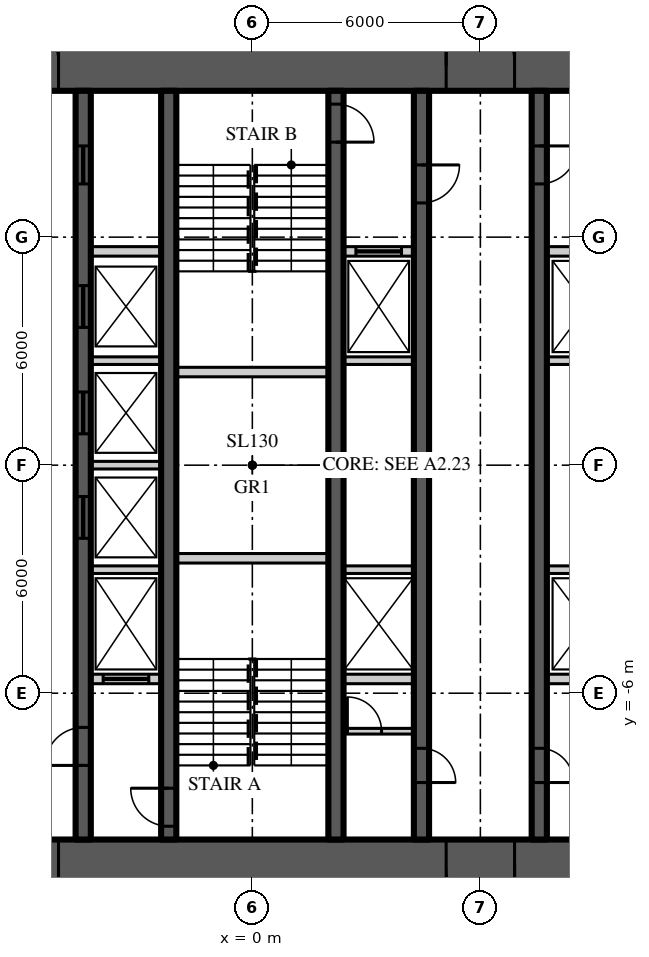
"""IFC4 building model, lengths in metres.
Left out: names, types, materials, properties, quantities, classifications, styles, units other than length and angle.
Written with IfcOpenShell. Run it as: python <this file> out.ifc"""

import sys

from ifc_helpers import new_model, si_unit, direction, frame, frame_2d, origin, place, context, subcontext, project, spatial, rectangle, extrude, element, fill, save


model = new_model("IFC4")
c1 = context("Model", 3, precision=1e-05, world=origin(), true_north=direction((0.0, 1.0)))
c2 = subcontext(c1, "Body", "Model", "MODEL_VIEW")
j1 = project(units=[si_unit("LENGTHUNIT", "METRE"), si_unit("PLANEANGLEUNIT", "RADIAN")], contexts=[c1])
p1 = place(None, origin())
s1 = spatial("IfcSite", under=j1, at=p1, CompositionType="ELEMENT")
p2 = place(p1, origin())
s2 = spatial("IfcBuilding", under=s1, at=p2, CompositionType="ELEMENT")
p3 = place(p2, frame((0.0, 0.0, 178.8)))
s3 = spatial("IfcBuildingStorey", under=s2, at=p3, CompositionType="ELEMENT", Elevation=178.8)
p4 = place(p3, frame((-11.15, 10.5, 0.0), z_axis=(0.0, 0.0, 1.0), x_axis=(1.0, 0.0, 0.0)))
e1 = element("IfcWall", 1, at=p4, inside=s3, PredefinedType="SHEAR", context=c2, shape_type="SweptSolid", body=[
    extrude(rectangle(XDim=22.3, YDim=1.3, at=frame_2d((11.15, 0.0))), origin(), (0.0, 0.0, 1.0), 3.9),
])
p5 = place(p4, frame((4.25, 0.0, 0.0)))
e2 = element("IfcOpeningElement", 2, at=p5, cuts=e1, PredefinedType="OPENING", context=c2, shape_type="SweptSolid", body=[
    extrude(rectangle(XDim=1.8, YDim=2.2, at=frame_2d((0.9, 1.1))), frame((0.0, 0.66, 0.0), z_axis=(0.0, -1.0, 0.0), x_axis=(1.0, 0.0, 0.0)), (0.0, 0.0, 1.0), 1.32),
])
p6 = place(p4, frame((16.25, 0.0, 0.0)))
e3 = element("IfcOpeningElement", 3, at=p6, cuts=e1, PredefinedType="OPENING", context=c2, shape_type="SweptSolid", body=[
    extrude(rectangle(XDim=1.8, YDim=2.2, at=frame_2d((0.9, 1.1))), frame((0.0, 0.66, 0.0), z_axis=(0.0, -1.0, 0.0), x_axis=(1.0, 0.0, 0.0)), (0.0, 0.0, 1.0), 1.32),
])
p7 = place(p3, frame((11.15, -10.5, 0.0), z_axis=(0.0, 0.0, 1.0), x_axis=(-1.0, 0.0, 0.0)))
e4 = element("IfcWall", 4, at=p7, inside=s3, PredefinedType="SHEAR", context=c2, shape_type="SweptSolid", body=[
    extrude(rectangle(XDim=22.3, YDim=1.3, at=frame_2d((11.15, 0.0))), origin(), (0.0, 0.0, 1.0), 3.9),
])
p8 = place(p7, frame((16.25, 0.0, 0.0)))
e5 = element("IfcOpeningElement", 5, at=p8, cuts=e4, PredefinedType="OPENING", context=c2, shape_type="SweptSolid", body=[
    extrude(rectangle(XDim=1.8, YDim=2.2, at=frame_2d((0.9, 1.1))), frame((0.0, 0.66, 0.0), z_axis=(0.0, -1.0, 0.0), x_axis=(1.0, 0.0, 0.0)), (0.0, 0.0, 1.0), 1.32),
])
p9 = place(p7, frame((4.25, 0.0, 0.0)))
e6 = element("IfcOpeningElement", 6, at=p9, cuts=e4, PredefinedType="OPENING", context=c2, shape_type="SweptSolid", body=[
    extrude(rectangle(XDim=1.8, YDim=2.2, at=frame_2d((0.9, 1.1))), frame((0.0, 0.66, 0.0), z_axis=(0.0, -1.0, 0.0), x_axis=(1.0, 0.0, 0.0)), (0.0, 0.0, 1.0), 1.32),
])
p10 = place(p3, frame((7.55, 9.85, 0.0), z_axis=(0.0, 0.0, 1.0), x_axis=(0.0, -1.0, 0.0)))
e7 = element("IfcWall", 7, at=p10, inside=s3, PredefinedType="SHEAR", context=c2, shape_type="SweptSolid", body=[
    extrude(rectangle(XDim=19.7, YDim=0.4, at=frame_2d((9.85, 0.0))), origin(), (0.0, 0.0, 1.0), 3.9),
])
p11 = place(p10, frame((1.45, 0.0, 0.0)))
e8 = element("IfcOpeningElement", 8, at=p11, cuts=e7, PredefinedType="OPENING", context=c2, shape_type="SweptSolid", body=[
    extrude(rectangle(XDim=1.0, YDim=2.2, at=frame_2d((0.5, 1.1))), frame((0.0, 0.21, 0.0), z_axis=(0.0, -1.0, 0.0), x_axis=(1.0, 0.0, 0.0)), (0.0, 0.0, 1.0), 0.42),
])
p12 = place(p10, frame((17.3, 0.0, 0.0)))
e9 = element("IfcOpeningElement", 9, at=p12, cuts=e7, PredefinedType="OPENING", context=c2, shape_type="SweptSolid", body=[
    extrude(rectangle(XDim=0.9, YDim=2.1, at=frame_2d((0.45, 1.05))), frame((0.0, 0.21, 0.0), z_axis=(0.0, -1.0, 0.0), x_axis=(1.0, 0.0, 0.0)), (0.0, 0.0, 1.0), 0.42),
])
p13 = place(p3, frame((-4.45, -9.85, 0.0), z_axis=(0.0, 0.0, 1.0), x_axis=(0.0, 1.0, 0.0)))
e10 = element("IfcWall", 10, at=p13, inside=s3, PredefinedType="SHEAR", context=c2, shape_type="SweptSolid", body=[
    extrude(rectangle(XDim=19.7, YDim=0.4, at=frame_2d((9.85, 0.0))), origin(), (0.0, 0.0, 1.0), 3.9),
])
p14 = place(p13, frame((1.95, 0.0, 0.0)))
e11 = element("IfcOpeningElement", 11, at=p14, cuts=e10, PredefinedType="OPENING", context=c2, shape_type="SweptSolid", body=[
    extrude(rectangle(XDim=1.0, YDim=2.2, at=frame_2d((0.5, 1.1))), frame((0.0, 0.21, 0.0), z_axis=(0.0, -1.0, 0.0), x_axis=(1.0, 0.0, 0.0)), (0.0, 0.0, 1.0), 0.42),
])
p15 = place(p13, frame((17.25, 0.0, 0.0)))
e12 = element("IfcOpeningElement", 12, at=p15, cuts=e10, PredefinedType="OPENING", context=c2, shape_type="SweptSolid", body=[
    extrude(rectangle(XDim=1.0, YDim=2.1, at=frame_2d((0.5, 1.05))), frame((0.0, 0.21, 0.0), z_axis=(0.0, -1.0, 0.0), x_axis=(1.0, 0.0, 0.0)), (0.0, 0.0, 1.0), 0.42),
])
p16 = place(p13, frame((7.925, 0.0, 0.0)))
e13 = element("IfcOpeningElement", 13, at=p16, cuts=e10, PredefinedType="OPENING", context=c2, shape_type="SweptSolid", body=[
    extrude(rectangle(XDim=1.1, YDim=2.2, at=frame_2d((0.55, 1.1))), frame((0.0, 0.21, 0.0), z_axis=(0.0, -1.0, 0.0), x_axis=(1.0, 0.0, 0.0)), (0.0, 0.0, 1.0), 0.42),
])
p17 = place(p13, frame((10.675, 0.0, 0.0)))
e14 = element("IfcOpeningElement", 14, at=p17, cuts=e10, PredefinedType="OPENING", context=c2, shape_type="SweptSolid", body=[
    extrude(rectangle(XDim=1.1, YDim=2.2, at=frame_2d((0.55, 1.1))), frame((0.0, 0.21, 0.0), z_axis=(0.0, -1.0, 0.0), x_axis=(1.0, 0.0, 0.0)), (0.0, 0.0, 1.0), 0.42),
])
p18 = place(p13, frame((13.475, 0.0, 0.0)))
e15 = element("IfcOpeningElement", 15, at=p18, cuts=e10, PredefinedType="OPENING", context=c2, shape_type="SweptSolid", body=[
    extrude(rectangle(XDim=1.1, YDim=2.2, at=frame_2d((0.55, 1.1))), frame((0.0, 0.21, 0.0), z_axis=(0.0, -1.0, 0.0), x_axis=(1.0, 0.0, 0.0)), (0.0, 0.0, 1.0), 0.42),
])
p19 = place(p3, frame((4.45, 9.85, 0.0), z_axis=(0.0, 0.0, 1.0), x_axis=(0.0, -1.0, 0.0)))
e16 = element("IfcWall", 16, at=p19, inside=s3, PredefinedType="SHEAR", context=c2, shape_type="SweptSolid", body=[
    extrude(rectangle(XDim=19.7, YDim=0.4, at=frame_2d((9.85, 0.0))), origin(), (0.0, 0.0, 1.0), 3.9),
])
p20 = place(p19, frame((1.95, 0.0, 0.0)))
e17 = element("IfcOpeningElement", 17, at=p20, cuts=e16, PredefinedType="OPENING", context=c2, shape_type="SweptSolid", body=[
    extrude(rectangle(XDim=1.0, YDim=2.2, at=frame_2d((0.5, 1.1))), frame((0.0, 0.21, 0.0), z_axis=(0.0, -1.0, 0.0), x_axis=(1.0, 0.0, 0.0)), (0.0, 0.0, 1.0), 0.42),
])
p21 = place(p19, frame((17.3, 0.0, 0.0)))
e18 = element("IfcOpeningElement", 18, at=p21, cuts=e16, PredefinedType="OPENING", context=c2, shape_type="SweptSolid", body=[
    extrude(rectangle(XDim=0.9, YDim=2.1, at=frame_2d((0.45, 1.05))), frame((0.0, 0.21, 0.0), z_axis=(0.0, -1.0, 0.0), x_axis=(1.0, 0.0, 0.0)), (0.0, 0.0, 1.0), 0.42),
])
p22 = place(p3, frame((-2.2, -9.85, 0.0), z_axis=(0.0, 0.0, 1.0), x_axis=(0.0, 1.0, 0.0)))
e19 = element("IfcWall", 19, at=p22, inside=s3, PredefinedType="SHEAR", context=c2, shape_type="SweptSolid", body=[
    extrude(rectangle(XDim=19.7, YDim=0.4, at=frame_2d((9.85, 0.0))), origin(), (0.0, 0.0, 1.0), 3.9),
])
p23 = place(p22, frame((0.35, 0.0, 0.0)))
e20 = element("IfcOpeningElement", 20, at=p23, cuts=e19, PredefinedType="OPENING", context=c2, shape_type="SweptSolid", body=[
    extrude(rectangle(XDim=1.0, YDim=2.2, at=frame_2d((0.5, 1.1))), frame((0.0, 0.21, 0.0), z_axis=(0.0, -1.0, 0.0), x_axis=(1.0, 0.0, 0.0)), (0.0, 0.0, 1.0), 0.42),
])
p24 = place(p3, frame((2.2, 9.85, 0.0), z_axis=(0.0, 0.0, 1.0), x_axis=(0.0, -1.0, 0.0)))
e21 = element("IfcWall", 21, at=p24, inside=s3, PredefinedType="SHEAR", context=c2, shape_type="SweptSolid", body=[
    extrude(rectangle(XDim=19.7, YDim=0.4, at=frame_2d((9.85, 0.0))), origin(), (0.0, 0.0, 1.0), 3.9),
])
p25 = place(p24, frame((0.35, 0.0, 0.0)))
e22 = element("IfcOpeningElement", 22, at=p25, cuts=e21, PredefinedType="OPENING", context=c2, shape_type="SweptSolid", body=[
    extrude(rectangle(XDim=1.0, YDim=2.2, at=frame_2d((0.5, 1.1))), frame((0.0, 0.21, 0.0), z_axis=(0.0, -1.0, 0.0), x_axis=(1.0, 0.0, 0.0)), (0.0, 0.0, 1.0), 0.42),
])
p26 = place(p3, frame((-4.25, 5.625, 0.0), z_axis=(0.0, 0.0, 1.0), x_axis=(1.0, 0.0, 0.0)))
e23 = element("IfcWall", 23, at=p26, inside=s3, PredefinedType="SOLIDWALL", context=c2, shape_type="SweptSolid", body=[
    extrude(rectangle(XDim=1.85, YDim=0.25, at=frame_2d((0.925, 0.0))), origin(), (0.0, 0.0, 1.0), 3.7),
])
p27 = place(p3, frame((2.4, 5.625, 0.0), z_axis=(0.0, 0.0, 1.0), x_axis=(1.0, 0.0, 0.0)))
e24 = element("IfcWall", 24, at=p27, inside=s3, PredefinedType="SOLIDWALL", context=c2, shape_type="SweptSolid", body=[
    extrude(rectangle(XDim=1.85, YDim=0.25, at=frame_2d((0.925, 0.0))), origin(), (0.0, 0.0, 1.0), 3.7),
])
p28 = place(p27, frame((0.325, 0.0, 0.0)))
e25 = element("IfcOpeningElement", 25, at=p28, cuts=e24, PredefinedType="OPENING", context=c2, shape_type="SweptSolid", body=[
    extrude(rectangle(XDim=1.2, YDim=2.2, at=frame_2d((0.6, 1.1))), frame((0.0, 0.135, 0.0), z_axis=(0.0, -1.0, 0.0), x_axis=(1.0, 0.0, 0.0)), (0.0, 0.0, 1.0), 0.27),
])
p29 = place(p3, frame((7.75, 5.625, 0.0), z_axis=(0.0, 0.0, 1.0), x_axis=(1.0, 0.0, 0.0)))
e26 = element("IfcWall", 26, at=p29, inside=s3, PredefinedType="SOLIDWALL", context=c2, shape_type="SweptSolid", body=[
    extrude(rectangle(XDim=2.1, YDim=0.25, at=frame_2d((1.05, 0.0))), origin(), (0.0, 0.0, 1.0), 3.7),
])
p30 = place(p3, frame((-4.25, -5.625, 0.0), z_axis=(0.0, 0.0, 1.0), x_axis=(1.0, 0.0, 0.0)))
e27 = element("IfcWall", 27, at=p30, inside=s3, PredefinedType="SOLIDWALL", context=c2, shape_type="SweptSolid", body=[
    extrude(rectangle(XDim=1.85, YDim=0.25, at=frame_2d((0.925, 0.0))), origin(), (0.0, 0.0, 1.0), 3.7),
])
p31 = place(p30, frame((0.325, 0.0, 0.0)))
e28 = element("IfcOpeningElement", 28, at=p31, cuts=e27, PredefinedType="OPENING", context=c2, shape_type="SweptSolid", body=[
    extrude(rectangle(XDim=1.2, YDim=2.2, at=frame_2d((0.6, 1.1))), frame((0.0, 0.135, 0.0), z_axis=(0.0, -1.0, 0.0), x_axis=(1.0, 0.0, 0.0)), (0.0, 0.0, 1.0), 0.27),
])
p32 = place(p3, frame((2.4, -5.625, 0.0), z_axis=(0.0, 0.0, 1.0), x_axis=(1.0, 0.0, 0.0)))
e29 = element("IfcWall", 29, at=p32, inside=s3, PredefinedType="SOLIDWALL", context=c2, shape_type="SweptSolid", body=[
    extrude(rectangle(XDim=1.85, YDim=0.25, at=frame_2d((0.925, 0.0))), origin(), (0.0, 0.0, 1.0), 3.7),
])
p33 = place(p3, frame((7.75, -5.625, 0.0), z_axis=(0.0, 0.0, 1.0), x_axis=(1.0, 0.0, 0.0)))
e30 = element("IfcWall", 30, at=p33, inside=s3, PredefinedType="SOLIDWALL", context=c2, shape_type="SweptSolid", body=[
    extrude(rectangle(XDim=2.1, YDim=0.25, at=frame_2d((1.05, 0.0))), origin(), (0.0, 0.0, 1.0), 3.7),
])
for number, where, z_axis, x_axis in (
    (31, (-2.0, -2.45, 0.0), (0.0, 0.0, 1.0), (1.0, 0.0, 0.0)),
    (32, (-2.0, 2.45, 0.0), (0.0, 0.0, 1.0), (1.0, 0.0, 0.0)),
):
    element("IfcWall", number, at=place(p3, frame(where, z_axis=z_axis, x_axis=x_axis)), inside=s3, PredefinedType="SOLIDWALL", context=c2, shape_type="SweptSolid", body=[
        extrude(rectangle(XDim=4.0, YDim=0.25, at=frame_2d((2.0, 0.0))), origin(), (0.0, 0.0, 1.0), 3.7),
    ])
for number, where, z_axis, x_axis in (
    (33, (-4.25, -2.75, 0.0), (0.0, 0.0, 1.0), (1.0, 0.0, 0.0)),
    (34, (2.4, -2.75, 0.0), (0.0, 0.0, 1.0), (1.0, 0.0, 0.0)),
):
    element("IfcWall", number, at=place(p3, frame(where, z_axis=z_axis, x_axis=x_axis)), inside=s3, PredefinedType="SOLIDWALL", context=c2, shape_type="SweptSolid", body=[
        extrude(rectangle(XDim=1.85, YDim=0.2, at=frame_2d((0.925, 0.0))), origin(), (0.0, 0.0, 1.0), 3.7),
    ])
p34 = place(p3, frame((7.75, -2.75, 0.0), z_axis=(0.0, 0.0, 1.0), x_axis=(1.0, 0.0, 0.0)))
e35 = element("IfcWall", 35, at=p34, inside=s3, PredefinedType="SOLIDWALL", context=c2, shape_type="SweptSolid", body=[
    extrude(rectangle(XDim=2.1, YDim=0.2, at=frame_2d((1.05, 0.0))), origin(), (0.0, 0.0, 1.0), 3.7),
])
for number, where, z_axis, x_axis in (
    (36, (-4.25, 0.0, 0.0), (0.0, 0.0, 1.0), (1.0, 0.0, 0.0)),
    (37, (-4.25, 2.75, 0.0), (0.0, 0.0, 1.0), (1.0, 0.0, 0.0)),
    (38, (2.4, 2.75, 0.0), (0.0, 0.0, 1.0), (1.0, 0.0, 0.0)),
):
    element("IfcWall", number, at=place(p3, frame(where, z_axis=z_axis, x_axis=x_axis)), inside=s3, PredefinedType="SOLIDWALL", context=c2, shape_type="SweptSolid", body=[
        extrude(rectangle(XDim=1.85, YDim=0.2, at=frame_2d((0.925, 0.0))), origin(), (0.0, 0.0, 1.0), 3.7),
    ])
p35 = place(p3, frame((7.75, 2.75, 0.0), z_axis=(0.0, 0.0, 1.0), x_axis=(1.0, 0.0, 0.0)))
e39 = element("IfcWall", 39, at=p35, inside=s3, PredefinedType="SOLIDWALL", context=c2, shape_type="SweptSolid", body=[
    extrude(rectangle(XDim=2.1, YDim=0.2, at=frame_2d((1.05, 0.0))), origin(), (0.0, 0.0, 1.0), 3.7),
])
p36 = place(p3, frame((2.4, -7.0, 0.0), z_axis=(0.0, 0.0, 1.0), x_axis=(1.0, 0.0, 0.0)))
e40 = element("IfcWall", 40, at=p36, inside=s3, PredefinedType="SOLIDWALL", context=c2, shape_type="SweptSolid", body=[
    extrude(rectangle(XDim=1.85, YDim=0.15, at=frame_2d((0.925, 0.0))), origin(), (0.0, 0.0, 1.0), 3.77),
])
p37 = place(p36, frame((0.1, 0.0, 0.0)))
e41 = element("IfcOpeningElement", 41, at=p37, cuts=e40, PredefinedType="OPENING", context=c2, shape_type="SweptSolid", body=[
    extrude(rectangle(XDim=0.9, YDim=2.1, at=frame_2d((0.45, 1.05))), frame((0.0, 0.085, 0.0), z_axis=(0.0, -1.0, 0.0), x_axis=(1.0, 0.0, 0.0)), (0.0, 0.0, 1.0), 0.17),
])
p38 = place(p5, origin())
e42 = element("IfcDoor", 42, at=p38, inside=s3, OperationType="DOUBLE_DOOR_DOUBLE_SWING", PredefinedType="DOOR", context=c2, shape_type="SweptSolid", body=[
    extrude(rectangle(XDim=1.8, YDim=2.2, at=frame_2d((0.9, 1.1))), frame((0.0, 0.025, 0.0), z_axis=(0.0, -1.0, 0.0), x_axis=(1.0, 0.0, 0.0)), (0.0, 0.0, 1.0), 0.05),
])
fill(e2, e42)
p39 = place(p8, origin())
e43 = element("IfcDoor", 43, at=p39, inside=s3, OperationType="DOUBLE_DOOR_DOUBLE_SWING", PredefinedType="DOOR", context=c2, shape_type="SweptSolid", body=[
    extrude(rectangle(XDim=1.8, YDim=2.2, at=frame_2d((0.9, 1.1))), frame((0.0, 0.025, 0.0), z_axis=(0.0, -1.0, 0.0), x_axis=(1.0, 0.0, 0.0)), (0.0, 0.0, 1.0), 0.05),
])
fill(e5, e43)
p40 = place(p6, origin())
e44 = element("IfcDoor", 44, at=p40, inside=s3, OperationType="DOUBLE_DOOR_DOUBLE_SWING", PredefinedType="DOOR", context=c2, shape_type="SweptSolid", body=[
    extrude(rectangle(XDim=1.8, YDim=2.2, at=frame_2d((0.9, 1.1))), frame((0.0, 0.025, 0.0), z_axis=(0.0, -1.0, 0.0), x_axis=(1.0, 0.0, 0.0)), (0.0, 0.0, 1.0), 0.05),
])
fill(e3, e44)
p41 = place(p9, origin())
e45 = element("IfcDoor", 45, at=p41, inside=s3, OperationType="DOUBLE_DOOR_DOUBLE_SWING", PredefinedType="DOOR", context=c2, shape_type="SweptSolid", body=[
    extrude(rectangle(XDim=1.8, YDim=2.2, at=frame_2d((0.9, 1.1))), frame((0.0, 0.025, 0.0), z_axis=(0.0, -1.0, 0.0), x_axis=(1.0, 0.0, 0.0)), (0.0, 0.0, 1.0), 0.05),
])
fill(e6, e45)
p42 = place(p11, origin())
e46 = element("IfcDoor", 46, at=p42, inside=s3, OperationType="SINGLE_SWING_LEFT", PredefinedType="DOOR", context=c2, shape_type="SweptSolid", body=[
    extrude(rectangle(XDim=1.0, YDim=2.2, at=frame_2d((0.5, 1.1))), frame((0.0, 0.025, 0.0), z_axis=(0.0, -1.0, 0.0), x_axis=(1.0, 0.0, 0.0)), (0.0, 0.0, 1.0), 0.05),
])
fill(e8, e46)
p43 = place(p14, origin())
e47 = element("IfcDoor", 47, at=p43, inside=s3, OperationType="SINGLE_SWING_LEFT", PredefinedType="DOOR", context=c2, shape_type="SweptSolid", body=[
    extrude(rectangle(XDim=1.0, YDim=2.2, at=frame_2d((0.5, 1.1))), frame((0.0, 0.025, 0.0), z_axis=(0.0, -1.0, 0.0), x_axis=(1.0, 0.0, 0.0)), (0.0, 0.0, 1.0), 0.05),
])
fill(e11, e47)
p44 = place(p23, origin())
e48 = element("IfcDoor", 48, at=p44, inside=s3, OperationType="SINGLE_SWING_RIGHT", PredefinedType="DOOR", context=c2, shape_type="SweptSolid", body=[
    extrude(rectangle(XDim=1.0, YDim=2.2, at=frame_2d((0.5, 1.1))), frame((0.0, 0.025, 0.0), z_axis=(0.0, -1.0, 0.0), x_axis=(1.0, 0.0, 0.0)), (0.0, 0.0, 1.0), 0.05),
])
fill(e20, e48)
p45 = place(p20, origin())
e49 = element("IfcDoor", 49, at=p45, inside=s3, OperationType="SINGLE_SWING_LEFT", PredefinedType="DOOR", context=c2, shape_type="SweptSolid", body=[
    extrude(rectangle(XDim=1.0, YDim=2.2, at=frame_2d((0.5, 1.1))), frame((0.0, 0.025, 0.0), z_axis=(0.0, -1.0, 0.0), x_axis=(1.0, 0.0, 0.0)), (0.0, 0.0, 1.0), 0.05),
])
fill(e17, e49)
p46 = place(p25, origin())
e50 = element("IfcDoor", 50, at=p46, inside=s3, OperationType="SINGLE_SWING_RIGHT", PredefinedType="DOOR", context=c2, shape_type="SweptSolid", body=[
    extrude(rectangle(XDim=1.0, YDim=2.2, at=frame_2d((0.5, 1.1))), frame((0.0, 0.025, 0.0), z_axis=(0.0, -1.0, 0.0), x_axis=(1.0, 0.0, 0.0)), (0.0, 0.0, 1.0), 0.05),
])
fill(e22, e50)
p47 = place(p15, origin())
e51 = element("IfcDoor", 51, at=p47, inside=s3, OperationType="SLIDING_TO_LEFT", PredefinedType="DOOR", context=c2, shape_type="SweptSolid", body=[
    extrude(rectangle(XDim=1.0, YDim=2.1, at=frame_2d((0.5, 1.05))), frame((0.0, 0.025, 0.0), z_axis=(0.0, -1.0, 0.0), x_axis=(1.0, 0.0, 0.0)), (0.0, 0.0, 1.0), 0.05),
])
fill(e12, e51)
p48 = place(p12, origin())
e52 = element("IfcDoor", 52, at=p48, inside=s3, OperationType="SINGLE_SWING_RIGHT", PredefinedType="DOOR", context=c2, shape_type="SweptSolid", body=[
    extrude(rectangle(XDim=0.9, YDim=2.1, at=frame_2d((0.45, 1.05))), frame((0.0, 0.025, 0.0), z_axis=(0.0, -1.0, 0.0), x_axis=(1.0, 0.0, 0.0)), (0.0, 0.0, 1.0), 0.05),
])
fill(e9, e52)
p49 = place(p21, origin())
e53 = element("IfcDoor", 53, at=p49, inside=s3, OperationType="SINGLE_SWING_RIGHT", PredefinedType="DOOR", context=c2, shape_type="SweptSolid", body=[
    extrude(rectangle(XDim=0.9, YDim=2.1, at=frame_2d((0.45, 1.05))), frame((0.0, 0.025, 0.0), z_axis=(0.0, -1.0, 0.0), x_axis=(1.0, 0.0, 0.0)), (0.0, 0.0, 1.0), 0.05),
])
fill(e18, e53)
p50 = place(p16, origin())
e54 = element("IfcDoor", 54, at=p50, inside=s3, OperationType="SLIDING_TO_LEFT", PredefinedType="DOOR", context=c2, shape_type="SweptSolid", body=[
    extrude(rectangle(XDim=1.1, YDim=2.2, at=frame_2d((0.55, 1.1))), frame((0.0, 0.025, 0.0), z_axis=(0.0, -1.0, 0.0), x_axis=(1.0, 0.0, 0.0)), (0.0, 0.0, 1.0), 0.05),
])
fill(e13, e54)
p51 = place(p17, origin())
e55 = element("IfcDoor", 55, at=p51, inside=s3, OperationType="SLIDING_TO_LEFT", PredefinedType="DOOR", context=c2, shape_type="SweptSolid", body=[
    extrude(rectangle(XDim=1.1, YDim=2.2, at=frame_2d((0.55, 1.1))), frame((0.0, 0.025, 0.0), z_axis=(0.0, -1.0, 0.0), x_axis=(1.0, 0.0, 0.0)), (0.0, 0.0, 1.0), 0.05),
])
fill(e14, e55)
p52 = place(p18, origin())
e56 = element("IfcDoor", 56, at=p52, inside=s3, OperationType="SLIDING_TO_LEFT", PredefinedType="DOOR", context=c2, shape_type="SweptSolid", body=[
    extrude(rectangle(XDim=1.1, YDim=2.2, at=frame_2d((0.55, 1.1))), frame((0.0, 0.025, 0.0), z_axis=(0.0, -1.0, 0.0), x_axis=(1.0, 0.0, 0.0)), (0.0, 0.0, 1.0), 0.05),
])
fill(e15, e56)
p53 = place(p31, origin())
e57 = element("IfcDoor", 57, at=p53, inside=s3, OperationType="SLIDING_TO_LEFT", PredefinedType="DOOR", context=c2, shape_type="SweptSolid", body=[
    extrude(rectangle(XDim=1.2, YDim=2.2, at=frame_2d((0.6, 1.1))), frame((0.0, 0.025, 0.0), z_axis=(0.0, -1.0, 0.0), x_axis=(1.0, 0.0, 0.0)), (0.0, 0.0, 1.0), 0.05),
])
fill(e28, e57)
p54 = place(p28, origin())
e58 = element("IfcDoor", 58, at=p54, inside=s3, OperationType="SLIDING_TO_LEFT", PredefinedType="DOOR", context=c2, shape_type="SweptSolid", body=[
    extrude(rectangle(XDim=1.2, YDim=2.2, at=frame_2d((0.6, 1.1))), frame((0.0, 0.025, 0.0), z_axis=(0.0, -1.0, 0.0), x_axis=(1.0, 0.0, 0.0)), (0.0, 0.0, 1.0), 0.05),
])
fill(e25, e58)
p55 = place(p37, origin())
e59 = element("IfcDoor", 59, at=p55, inside=s3, OperationType="SINGLE_SWING_LEFT", PredefinedType="DOOR", context=c2, shape_type="SweptSolid", body=[
    extrude(rectangle(XDim=0.9, YDim=2.1, at=frame_2d((0.45, 1.05))), frame((0.0, 0.025, 0.0), z_axis=(0.0, -1.0, 0.0), x_axis=(1.0, 0.0, 0.0)), (0.0, 0.0, 1.0), 0.05),
])
fill(e41, e59)
save(model, sys.argv[1])
